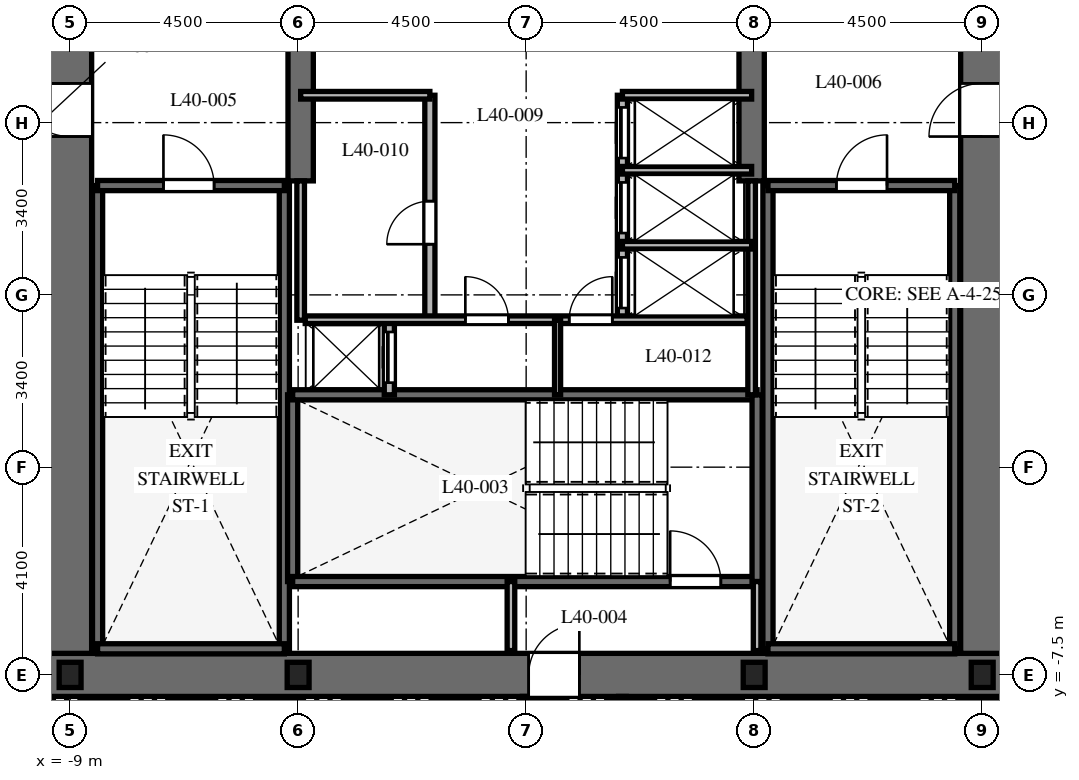
"""IFC4 building model, lengths in metres.
Left out: names, types, materials, properties, quantities, classifications, styles, units other than length and angle.
Written with IfcOpenShell. Run it as: python <this file> out.ifc"""

import sys

from ifc_helpers import new_model, si_unit, direction, frame, frame_2d, origin, origin_2d, place, context, subcontext, project, spatial, rectangle, i_section, extrude, element, fill, save


model = new_model("IFC4")
c1 = context("Model", 3, precision=1e-05, world=origin(), true_north=direction((0.0, 1.0)))
c2 = subcontext(c1, "Body", "Model", "MODEL_VIEW")
j1 = project(units=[si_unit("LENGTHUNIT", "METRE"), si_unit("PLANEANGLEUNIT", "RADIAN")], contexts=[c1])
p1 = place(None, origin())
s1 = spatial("IfcSite", under=j1, at=p1, CompositionType="ELEMENT")
p2 = place(p1, origin())
s2 = spatial("IfcBuilding", under=s1, at=p2, CompositionType="ELEMENT")
p3 = place(p2, frame((0.0, 0.0, 162.8)))
s3 = spatial("IfcBuildingStorey", under=s2, at=p3, CompositionType="ELEMENT", Elevation=162.8)
p4 = place(p3, frame((-9.425, -7.5, 0.0), z_axis=(0.0, 0.0, 1.0), x_axis=(1.0, 0.0, 0.0)))
e1 = element("IfcWall", 1, at=p4, inside=s3, PredefinedType="SHEAR", context=c2, shape_type="SweptSolid", body=[
    extrude(rectangle(XDim=18.85, YDim=0.85, at=frame_2d((9.425, 0.0))), origin(), (0.0, 0.0, 1.0), 3.7),
])
p5 = place(p4, frame((9.475, 0.0, 0.0)))
e2 = element("IfcOpeningElement", 2, at=p5, cuts=e1, PredefinedType="OPENING", context=c2, shape_type="SweptSolid", body=[
    extrude(rectangle(XDim=1.0, YDim=2.15, at=frame_2d((0.5, 1.075))), frame((0.0, 0.435, 0.0), z_axis=(0.0, -1.0, 0.0), x_axis=(1.0, 0.0, 0.0)), (0.0, 0.0, 1.0), 0.87),
])
p6 = place(p3, frame((-9.0, -7.075, 0.0), z_axis=(0.0, 0.0, 1.0), x_axis=(0.0, 1.0, 0.0)))
e3 = element("IfcWall", 3, at=p6, inside=s3, PredefinedType="SHEAR", context=c2, shape_type="SweptSolid", body=[
    extrude(rectangle(XDim=14.15, YDim=0.85, at=frame_2d((7.075, 0.0))), origin(), (0.0, 0.0, 1.0), 3.7),
])
p7 = place(p6, frame((10.2, 0.0, 0.0)))
e4 = element("IfcOpeningElement", 4, at=p7, cuts=e3, PredefinedType="OPENING", context=c2, shape_type="SweptSolid", body=[
    extrude(rectangle(XDim=1.05, YDim=2.15, at=frame_2d((0.525, 1.075))), frame((0.0, 0.435, 0.0), z_axis=(0.0, -1.0, 0.0), x_axis=(1.0, 0.0, 0.0)), (0.0, 0.0, 1.0), 0.87),
])
p8 = place(p3, frame((9.0, -7.075, 0.0), z_axis=(0.0, 0.0, 1.0), x_axis=(0.0, 1.0, 0.0)))
e5 = element("IfcWall", 5, at=p8, inside=s3, PredefinedType="SHEAR", context=c2, shape_type="SweptSolid", body=[
    extrude(rectangle(XDim=14.15, YDim=0.85, at=frame_2d((7.075, 0.0))), origin(), (0.0, 0.0, 1.0), 3.7),
])
p9 = place(p8, frame((10.2, 0.0, 0.0)))
e6 = element("IfcOpeningElement", 6, at=p9, cuts=e5, PredefinedType="OPENING", context=c2, shape_type="SweptSolid", body=[
    extrude(rectangle(XDim=1.05, YDim=2.15, at=frame_2d((0.525, 1.075))), frame((0.0, 0.435, 0.0), z_axis=(0.0, -1.0, 0.0), x_axis=(1.0, 0.0, 0.0)), (0.0, 0.0, 1.0), 0.87),
])
for number, where, z_axis, x_axis in (
    (7, (-4.45, 2.25, 0.0), (0.0, 0.0, 1.0), (0.0, 1.0, 0.0)),
    (8, (4.45, 2.25, 0.0), (0.0, 0.0, 1.0), (0.0, 1.0, 0.0)),
):
    element("IfcWall", number, at=place(p3, frame(where, z_axis=z_axis, x_axis=x_axis)), inside=s3, PredefinedType="SHEAR", context=c2, shape_type="SweptSolid", body=[
        extrude(rectangle(XDim=4.825, YDim=0.5, at=frame_2d((2.413, 0.0))), origin(), (0.0, 0.0, 1.0), 3.7),
    ])
for number, where, z_axis, x_axis in (
    (9, (-8.458, -6.985, 0.0), (0.0, 0.0, 1.0), (0.0, 1.0, 0.0)),
    (10, (-4.772, -6.985, 0.0), (0.0, 0.0, 1.0), (0.0, 1.0, 0.0)),
):
    element("IfcWall", number, at=place(p3, frame(where, z_axis=z_axis, x_axis=x_axis)), inside=s3, PredefinedType="SHEAR", context=c2, shape_type="SweptSolid", body=[
        extrude(rectangle(XDim=9.143, YDim=0.2, at=frame_2d((4.572, 0.0))), origin(), (0.0, 0.0, 1.0), 3.7),
    ])
p10 = place(p3, frame((-8.458, -6.985, 0.0), z_axis=(0.0, 0.0, 1.0), x_axis=(1.0, 0.0, 0.0)))
e11 = element("IfcWall", 11, at=p10, inside=s3, PredefinedType="SHEAR", context=c2, shape_type="SweptSolid", body=[
    extrude(rectangle(XDim=3.686, YDim=0.2, at=frame_2d((1.843, 0.0))), origin(), (0.0, 0.0, 1.0), 3.7),
])
p11 = place(p3, frame((-8.458, 2.158, 0.0), z_axis=(0.0, 0.0, 1.0), x_axis=(1.0, 0.0, 0.0)))
e12 = element("IfcWall", 12, at=p11, inside=s3, PredefinedType="SHEAR", context=c2, shape_type="SweptSolid", body=[
    extrude(rectangle(XDim=3.686, YDim=0.2, at=frame_2d((1.843, 0.0))), origin(), (0.0, 0.0, 1.0), 3.7),
])
p12 = place(p11, frame((1.3, 0.0, 0.0)))
e13 = element("IfcOpeningElement", 13, at=p12, cuts=e12, PredefinedType="OPENING", context=c2, shape_type="SweptSolid", body=[
    extrude(rectangle(XDim=1.0, YDim=2.15, at=frame_2d((0.5, 1.075))), frame((0.0, 0.11, 0.0), z_axis=(0.0, -1.0, 0.0), x_axis=(1.0, 0.0, 0.0)), (0.0, 0.0, 1.0), 0.22),
])
for number, where, z_axis, x_axis in (
    (14, (4.772, -6.985, 0.0), (0.0, 0.0, 1.0), (0.0, 1.0, 0.0)),
    (15, (8.458, -6.985, 0.0), (0.0, 0.0, 1.0), (0.0, 1.0, 0.0)),
):
    element("IfcWall", number, at=place(p3, frame(where, z_axis=z_axis, x_axis=x_axis)), inside=s3, PredefinedType="SHEAR", context=c2, shape_type="SweptSolid", body=[
        extrude(rectangle(XDim=9.143, YDim=0.2, at=frame_2d((4.572, 0.0))), origin(), (0.0, 0.0, 1.0), 3.7),
    ])
p13 = place(p3, frame((4.772, -6.985, 0.0), z_axis=(0.0, 0.0, 1.0), x_axis=(1.0, 0.0, 0.0)))
e16 = element("IfcWall", 16, at=p13, inside=s3, PredefinedType="SHEAR", context=c2, shape_type="SweptSolid", body=[
    extrude(rectangle(XDim=3.686, YDim=0.2, at=frame_2d((1.843, 0.0))), origin(), (0.0, 0.0, 1.0), 3.7),
])
p14 = place(p3, frame((4.772, 2.158, 0.0), z_axis=(0.0, 0.0, 1.0), x_axis=(1.0, 0.0, 0.0)))
e17 = element("IfcWall", 17, at=p14, inside=s3, PredefinedType="SHEAR", context=c2, shape_type="SweptSolid", body=[
    extrude(rectangle(XDim=3.686, YDim=0.2, at=frame_2d((1.843, 0.0))), origin(), (0.0, 0.0, 1.0), 3.7),
])
p15 = place(p14, frame((1.35, 0.0, 0.0)))
e18 = element("IfcOpeningElement", 18, at=p15, cuts=e17, PredefinedType="OPENING", context=c2, shape_type="SweptSolid", body=[
    extrude(rectangle(XDim=1.0, YDim=2.15, at=frame_2d((0.5, 1.075))), frame((0.0, 0.11, 0.0), z_axis=(0.0, -1.0, 0.0), x_axis=(1.0, 0.0, 0.0)), (0.0, 0.0, 1.0), 0.22),
])
p16 = place(p3, frame((-4.608, -5.658, 0.0), z_axis=(0.0, 0.0, 1.0), x_axis=(0.0, 1.0, 0.0)))
e19 = element("IfcWall", 19, at=p16, inside=s3, PredefinedType="SHEAR", context=c2, shape_type="SweptSolid", body=[
    extrude(rectangle(XDim=3.686, YDim=0.2, at=frame_2d((1.843, 0.0))), origin(), (0.0, 0.0, 1.0), 3.7),
])
p17 = place(p3, frame((-4.608, -5.658, 0.0), z_axis=(0.0, 0.0, 1.0), x_axis=(1.0, 0.0, 0.0)))
e20 = element("IfcWall", 20, at=p17, inside=s3, PredefinedType="SHEAR", context=c2, shape_type="SweptSolid", body=[
    extrude(rectangle(XDim=9.166, YDim=0.2, at=frame_2d((4.583, 0.0))), origin(), (0.0, 0.0, 1.0), 3.7),
])
p18 = place(p17, frame((7.45, 0.0, 0.0)))
e21 = element("IfcOpeningElement", 21, at=p18, cuts=e20, PredefinedType="OPENING", context=c2, shape_type="SweptSolid", body=[
    extrude(rectangle(XDim=1.0, YDim=2.15, at=frame_2d((0.5, 1.075))), frame((0.0, 0.11, 0.0), z_axis=(0.0, -1.0, 0.0), x_axis=(1.0, 0.0, 0.0)), (0.0, 0.0, 1.0), 0.22),
])
p19 = place(p3, frame((-4.608, -1.972, 0.0), z_axis=(0.0, 0.0, 1.0), x_axis=(1.0, 0.0, 0.0)))
e22 = element("IfcWall", 22, at=p19, inside=s3, PredefinedType="SHEAR", context=c2, shape_type="SweptSolid", body=[
    extrude(rectangle(XDim=9.166, YDim=0.2, at=frame_2d((4.583, 0.0))), origin(), (0.0, 0.0, 1.0), 3.7),
])
p20 = place(p3, frame((4.558, -5.658, 0.0), z_axis=(0.0, 0.0, 1.0), x_axis=(0.0, 1.0, 0.0)))
e23 = element("IfcWall", 23, at=p20, inside=s3, PredefinedType="SHEAR", context=c2, shape_type="SweptSolid", body=[
    extrude(rectangle(XDim=3.686, YDim=0.2, at=frame_2d((1.843, 0.0))), origin(), (0.0, 0.0, 1.0), 3.7),
])
for number, where, z_axis, x_axis in (
    (24, (-9.0, -7.5, 0.0), (0.0, 0.0, 1.0), (1.0, 0.0, 0.0)),
    (25, (-4.5, -7.5, 0.0), (0.0, 0.0, 1.0), (1.0, 0.0, 0.0)),
    (26, (4.5, -7.5, 0.0), (0.0, 0.0, 1.0), (1.0, 0.0, 0.0)),
    (27, (9.0, -7.5, 0.0), (0.0, 0.0, 1.0), (1.0, 0.0, 0.0)),
):
    element("IfcColumn", number, at=place(p3, frame(where, z_axis=z_axis, x_axis=x_axis)), inside=s3, PredefinedType="COLUMN", context=c2, shape_type="SweptSolid", body=[
        extrude(i_section(OverallWidth=0.432, OverallDepth=0.498, WebThickness=0.056, FlangeThickness=0.089, at=origin_2d()), origin(), (0.0, 0.0, 1.0), 3.7),
    ])
for number, where, z_axis, x_axis in (
    (28, (-0.3, -7.02, 0.0), (0.0, 0.0, 1.0), (0.0, 1.0, 0.0)),
    (29, (4.558, -7.02, 0.0), (0.0, 0.0, 1.0), (0.0, 1.0, 0.0)),
):
    element("IfcWall", number, at=place(p3, frame(where, z_axis=z_axis, x_axis=x_axis)), inside=s3, PredefinedType="PARTITIONING", context=c2, shape_type="SweptSolid", body=[
        extrude(rectangle(XDim=1.362, YDim=0.15, at=frame_2d((0.681, 0.0))), origin(), (0.0, 0.0, 1.0), 3.4),
    ])
p21 = place(p3, frame((-2.7, -1.972, 0.0), z_axis=(0.0, 0.0, 1.0), x_axis=(0.0, 1.0, 0.0)))
e30 = element("IfcWall", 30, at=p21, inside=s3, PredefinedType="PARTITIONING", context=c2, shape_type="SweptSolid", body=[
    extrude(rectangle(XDim=1.472, YDim=0.2, at=frame_2d((0.736, 0.0))), origin(), (0.0, 0.0, 1.0), 3.4),
])
p22 = place(p21, frame((0.24, 0.0, 0.0)))
e31 = element("IfcOpeningElement", 31, at=p22, cuts=e30, PredefinedType="OPENING", context=c2, shape_type="SweptSolid", body=[
    extrude(rectangle(XDim=1.0, YDim=2.2, at=frame_2d((0.5, 1.1))), frame((0.0, 0.11, 0.0), z_axis=(0.0, -1.0, 0.0), x_axis=(1.0, 0.0, 0.0)), (0.0, 0.0, 1.0), 0.22),
])
p23 = place(p3, frame((-4.45, -0.5, 0.0), z_axis=(0.0, 0.0, 1.0), x_axis=(0.0, 1.0, 0.0)))
e32 = element("IfcWall", 32, at=p23, inside=s3, PredefinedType="PARTITIONING", context=c2, shape_type="SweptSolid", body=[
    extrude(rectangle(XDim=2.75, YDim=0.15, at=frame_2d((1.375, 0.0))), origin(), (0.0, 0.0, 1.0), 3.4),
])
p24 = place(p3, frame((4.45, -1.972, 0.0), z_axis=(0.0, 0.0, 1.0), x_axis=(0.0, 1.0, 0.0)))
e33 = element("IfcWall", 33, at=p24, inside=s3, PredefinedType="PARTITIONING", context=c2, shape_type="SweptSolid", body=[
    extrude(rectangle(XDim=4.222, YDim=0.15, at=frame_2d((2.111, 0.0))), origin(), (0.0, 0.0, 1.0), 3.4),
])
p25 = place(p3, frame((-1.9, -0.5, 0.0), z_axis=(0.0, 0.0, 1.0), x_axis=(0.0, 1.0, 0.0)))
e34 = element("IfcWall", 34, at=p25, inside=s3, PredefinedType="PARTITIONING", context=c2, shape_type="SweptSolid", body=[
    extrude(rectangle(XDim=4.44, YDim=0.2, at=frame_2d((2.22, 0.0))), origin(), (0.0, 0.0, 1.0), 3.4),
])
p26 = place(p25, frame((1.5, 0.0, 0.0)))
e35 = element("IfcOpeningElement", 35, at=p26, cuts=e34, PredefinedType="OPENING", context=c2, shape_type="SweptSolid", body=[
    extrude(rectangle(XDim=0.85, YDim=2.03, at=frame_2d((0.425, 1.015))), frame((0.0, 0.11, 0.0), z_axis=(0.0, -1.0, 0.0), x_axis=(1.0, 0.0, 0.0)), (0.0, 0.0, 1.0), 0.22),
])
p27 = place(p3, frame((-4.45, 3.94, 0.0), z_axis=(0.0, 0.0, 1.0), x_axis=(1.0, 0.0, 0.0)))
e36 = element("IfcWall", 36, at=p27, inside=s3, PredefinedType="PARTITIONING", context=c2, shape_type="SweptSolid", body=[
    extrude(rectangle(XDim=2.55, YDim=0.15, at=frame_2d((1.275, 0.0))), origin(), (0.0, 0.0, 1.0), 3.4),
])
p28 = place(p3, frame((1.9, -0.5, 0.0), z_axis=(0.0, 0.0, 1.0), x_axis=(0.0, 1.0, 0.0)))
e37 = element("IfcWall", 37, at=p28, inside=s3, PredefinedType="PARTITIONING", context=c2, shape_type="SweptSolid", body=[
    extrude(rectangle(XDim=4.44, YDim=0.2, at=frame_2d((2.22, 0.0))), origin(), (0.0, 0.0, 1.0), 3.4),
])
p29 = place(p28, frame((0.24, 0.0, 0.0)))
e38 = element("IfcOpeningElement", 38, at=p29, cuts=e37, PredefinedType="OPENING", context=c2, shape_type="SweptSolid", body=[
    extrude(rectangle(XDim=1.0, YDim=2.2, at=frame_2d((0.5, 1.1))), frame((0.0, 0.11, 0.0), z_axis=(0.0, -1.0, 0.0), x_axis=(1.0, 0.0, 0.0)), (0.0, 0.0, 1.0), 0.22),
])
p30 = place(p28, frame((1.72, 0.0, 0.0)))
e39 = element("IfcOpeningElement", 39, at=p30, cuts=e37, PredefinedType="OPENING", context=c2, shape_type="SweptSolid", body=[
    extrude(rectangle(XDim=1.0, YDim=2.2, at=frame_2d((0.5, 1.1))), frame((0.0, 0.11, 0.0), z_axis=(0.0, -1.0, 0.0), x_axis=(1.0, 0.0, 0.0)), (0.0, 0.0, 1.0), 0.22),
])
p31 = place(p28, frame((3.2, 0.0, 0.0)))
e40 = element("IfcOpeningElement", 40, at=p31, cuts=e37, PredefinedType="OPENING", context=c2, shape_type="SweptSolid", body=[
    extrude(rectangle(XDim=1.0, YDim=2.2, at=frame_2d((0.5, 1.1))), frame((0.0, 0.11, 0.0), z_axis=(0.0, -1.0, 0.0), x_axis=(1.0, 0.0, 0.0)), (0.0, 0.0, 1.0), 0.22),
])
for number, where, z_axis, x_axis in (
    (41, (1.9, 3.94, 0.0), (0.0, 0.0, 1.0), (1.0, 0.0, 0.0)),
    (42, (1.9, 0.98, 0.0), (0.0, 0.0, 1.0), (1.0, 0.0, 0.0)),
    (43, (1.9, 2.46, 0.0), (0.0, 0.0, 1.0), (1.0, 0.0, 0.0)),
):
    element("IfcWall", number, at=place(p3, frame(where, z_axis=z_axis, x_axis=x_axis)), inside=s3, PredefinedType="PARTITIONING", context=c2, shape_type="SweptSolid", body=[
        extrude(rectangle(XDim=2.55, YDim=0.15, at=frame_2d((1.275, 0.0))), origin(), (0.0, 0.0, 1.0), 3.4),
    ])
p32 = place(p3, frame((-4.36, -0.49, 0.0), z_axis=(0.0, 0.0, 1.0), x_axis=(1.0, 0.0, 0.0)))
e44 = element("IfcWall", 44, at=p32, inside=s3, PredefinedType="PARTITIONING", context=c2, shape_type="SweptSolid", body=[
    extrude(rectangle(XDim=8.72, YDim=0.15, at=frame_2d((4.36, 0.0))), origin(), (0.0, 0.0, 1.0), 3.4),
])
p33 = place(p32, frame((3.16, 0.0, 0.0)))
e45 = element("IfcOpeningElement", 45, at=p33, cuts=e44, PredefinedType="OPENING", context=c2, shape_type="SweptSolid", body=[
    extrude(rectangle(XDim=0.85, YDim=2.03, at=frame_2d((0.425, 1.015))), frame((0.0, 0.085, 0.0), z_axis=(0.0, -1.0, 0.0), x_axis=(1.0, 0.0, 0.0)), (0.0, 0.0, 1.0), 0.17),
])
p34 = place(p32, frame((5.21, 0.0, 0.0)))
e46 = element("IfcOpeningElement", 46, at=p34, cuts=e44, PredefinedType="OPENING", context=c2, shape_type="SweptSolid", body=[
    extrude(rectangle(XDim=0.85, YDim=2.03, at=frame_2d((0.425, 1.015))), frame((0.0, 0.085, 0.0), z_axis=(0.0, -1.0, 0.0), x_axis=(1.0, 0.0, 0.0)), (0.0, 0.0, 1.0), 0.17),
])
p35 = place(p3, frame((0.62, -1.972, 0.0), z_axis=(0.0, 0.0, 1.0), x_axis=(0.0, 1.0, 0.0)))
e47 = element("IfcWall", 47, at=p35, inside=s3, PredefinedType="PARTITIONING", context=c2, shape_type="SweptSolid", body=[
    extrude(rectangle(XDim=1.472, YDim=0.12, at=frame_2d((0.736, 0.0))), origin(), (0.0, 0.0, 1.0), 3.4),
])
for number, where, z_axis, x_axis in (
    (48, (0.0, -10.05, 0.0), (0.0, 0.0, 1.0), (0.0, 1.0, 0.0)),
    (49, (1.9, -7.925, 0.0), (0.0, 0.0, 1.0), (0.0, -1.0, 0.0)),
):
    element("IfcWall", number, at=place(p3, frame(where, z_axis=z_axis, x_axis=x_axis)), inside=s3, PredefinedType="PARTITIONING", context=c2, shape_type="SweptSolid", body=[
        extrude(rectangle(XDim=2.125, YDim=0.15, at=frame_2d((1.062, 0.0))), origin(), (0.0, 0.0, 1.0), 3.4),
    ])
p36 = place(p12, origin())
e50 = element("IfcDoor", 50, at=p36, inside=s3, OperationType="SINGLE_SWING_LEFT", PredefinedType="DOOR", context=c2, shape_type="SweptSolid", body=[
    extrude(rectangle(XDim=1.0, YDim=2.15, at=frame_2d((0.5, 1.075))), frame((0.0, 0.025, 0.0), z_axis=(0.0, -1.0, 0.0), x_axis=(1.0, 0.0, 0.0)), (0.0, 0.0, 1.0), 0.05),
])
fill(e13, e50)
p37 = place(p15, origin())
e51 = element("IfcDoor", 51, at=p37, inside=s3, OperationType="SINGLE_SWING_RIGHT", PredefinedType="DOOR", context=c2, shape_type="SweptSolid", body=[
    extrude(rectangle(XDim=1.0, YDim=2.15, at=frame_2d((0.5, 1.075))), frame((0.0, 0.025, 0.0), z_axis=(0.0, -1.0, 0.0), x_axis=(1.0, 0.0, 0.0)), (0.0, 0.0, 1.0), 0.05),
])
fill(e18, e51)
p38 = place(p18, origin())
e52 = element("IfcDoor", 52, at=p38, inside=s3, OperationType="SINGLE_SWING_LEFT", PredefinedType="DOOR", context=c2, shape_type="SweptSolid", body=[
    extrude(rectangle(XDim=1.0, YDim=2.15, at=frame_2d((0.5, 1.075))), frame((0.0, 0.025, 0.0), z_axis=(0.0, -1.0, 0.0), x_axis=(1.0, 0.0, 0.0)), (0.0, 0.0, 1.0), 0.05),
])
fill(e21, e52)
p39 = place(p5, origin())
e53 = element("IfcDoor", 53, at=p39, inside=s3, OperationType="SINGLE_SWING_RIGHT", PredefinedType="DOOR", context=c2, shape_type="SweptSolid", body=[
    extrude(rectangle(XDim=1.0, YDim=2.15, at=frame_2d((0.5, 1.075))), frame((0.0, 0.025, 0.0), z_axis=(0.0, -1.0, 0.0), x_axis=(1.0, 0.0, 0.0)), (0.0, 0.0, 1.0), 0.05),
])
fill(e2, e53)
p40 = place(p7, origin())
e54 = element("IfcDoor", 54, at=p40, inside=s3, OperationType="SINGLE_SWING_RIGHT", PredefinedType="DOOR", context=c2, shape_type="SweptSolid", body=[
    extrude(rectangle(XDim=1.05, YDim=2.15, at=frame_2d((0.525, 1.075))), frame((0.0, 0.025, 0.0), z_axis=(0.0, -1.0, 0.0), x_axis=(1.0, 0.0, 0.0)), (0.0, 0.0, 1.0), 0.05),
])
fill(e4, e54)
p41 = place(p9, origin())
e55 = element("IfcDoor", 55, at=p41, inside=s3, OperationType="SINGLE_SWING_LEFT", PredefinedType="DOOR", context=c2, shape_type="SweptSolid", body=[
    extrude(rectangle(XDim=1.05, YDim=2.15, at=frame_2d((0.525, 1.075))), frame((0.0, 0.025, 0.0), z_axis=(0.0, -1.0, 0.0), x_axis=(1.0, 0.0, 0.0)), (0.0, 0.0, 1.0), 0.05),
])
fill(e6, e55)
p42 = place(p22, origin())
e56 = element("IfcDoor", 56, at=p42, inside=s3, OperationType="SLIDING_TO_LEFT", PredefinedType="DOOR", context=c2, shape_type="SweptSolid", body=[
    extrude(rectangle(XDim=1.0, YDim=2.2, at=frame_2d((0.5, 1.1))), frame((0.0, 0.025, 0.0), z_axis=(0.0, -1.0, 0.0), x_axis=(1.0, 0.0, 0.0)), (0.0, 0.0, 1.0), 0.05),
])
fill(e31, e56)
p43 = place(p26, origin())
e57 = element("IfcDoor", 57, at=p43, inside=s3, OperationType="SINGLE_SWING_LEFT", PredefinedType="DOOR", context=c2, shape_type="SweptSolid", body=[
    extrude(rectangle(XDim=0.85, YDim=2.03, at=frame_2d((0.425, 1.015))), frame((0.0, 0.025, 0.0), z_axis=(0.0, -1.0, 0.0), x_axis=(1.0, 0.0, 0.0)), (0.0, 0.0, 1.0), 0.05),
])
fill(e35, e57)
p44 = place(p29, origin())
e58 = element("IfcDoor", 58, at=p44, inside=s3, OperationType="SLIDING_TO_RIGHT", PredefinedType="DOOR", context=c2, shape_type="SweptSolid", body=[
    extrude(rectangle(XDim=1.0, YDim=2.2, at=frame_2d((0.5, 1.1))), frame((0.0, 0.025, 0.0), z_axis=(0.0, -1.0, 0.0), x_axis=(1.0, 0.0, 0.0)), (0.0, 0.0, 1.0), 0.05),
])
fill(e38, e58)
p45 = place(p30, origin())
e59 = element("IfcDoor", 59, at=p45, inside=s3, OperationType="SLIDING_TO_RIGHT", PredefinedType="DOOR", context=c2, shape_type="SweptSolid", body=[
    extrude(rectangle(XDim=1.0, YDim=2.2, at=frame_2d((0.5, 1.1))), frame((0.0, 0.025, 0.0), z_axis=(0.0, -1.0, 0.0), x_axis=(1.0, 0.0, 0.0)), (0.0, 0.0, 1.0), 0.05),
])
fill(e39, e59)
p46 = place(p31, origin())
e60 = element("IfcDoor", 60, at=p46, inside=s3, OperationType="SLIDING_TO_RIGHT", PredefinedType="DOOR", context=c2, shape_type="SweptSolid", body=[
    extrude(rectangle(XDim=1.0, YDim=2.2, at=frame_2d((0.5, 1.1))), frame((0.0, 0.025, 0.0), z_axis=(0.0, -1.0, 0.0), x_axis=(1.0, 0.0, 0.0)), (0.0, 0.0, 1.0), 0.05),
])
fill(e40, e60)
p47 = place(p33, origin())
e61 = element("IfcDoor", 61, at=p47, inside=s3, OperationType="SINGLE_SWING_LEFT", PredefinedType="DOOR", context=c2, shape_type="SweptSolid", body=[
    extrude(rectangle(XDim=0.85, YDim=2.03, at=frame_2d((0.425, 1.015))), frame((0.0, 0.025, 0.0), z_axis=(0.0, -1.0, 0.0), x_axis=(1.0, 0.0, 0.0)), (0.0, 0.0, 1.0), 0.05),
])
fill(e45, e61)
p48 = place(p34, origin())
e62 = element("IfcDoor", 62, at=p48, inside=s3, OperationType="SINGLE_SWING_RIGHT", PredefinedType="DOOR", context=c2, shape_type="SweptSolid", body=[
    extrude(rectangle(XDim=0.85, YDim=2.03, at=frame_2d((0.425, 1.015))), frame((0.0, 0.025, 0.0), z_axis=(0.0, -1.0, 0.0), x_axis=(1.0, 0.0, 0.0)), (0.0, 0.0, 1.0), 0.05),
])
fill(e46, e62)
save(model, sys.argv[1])
